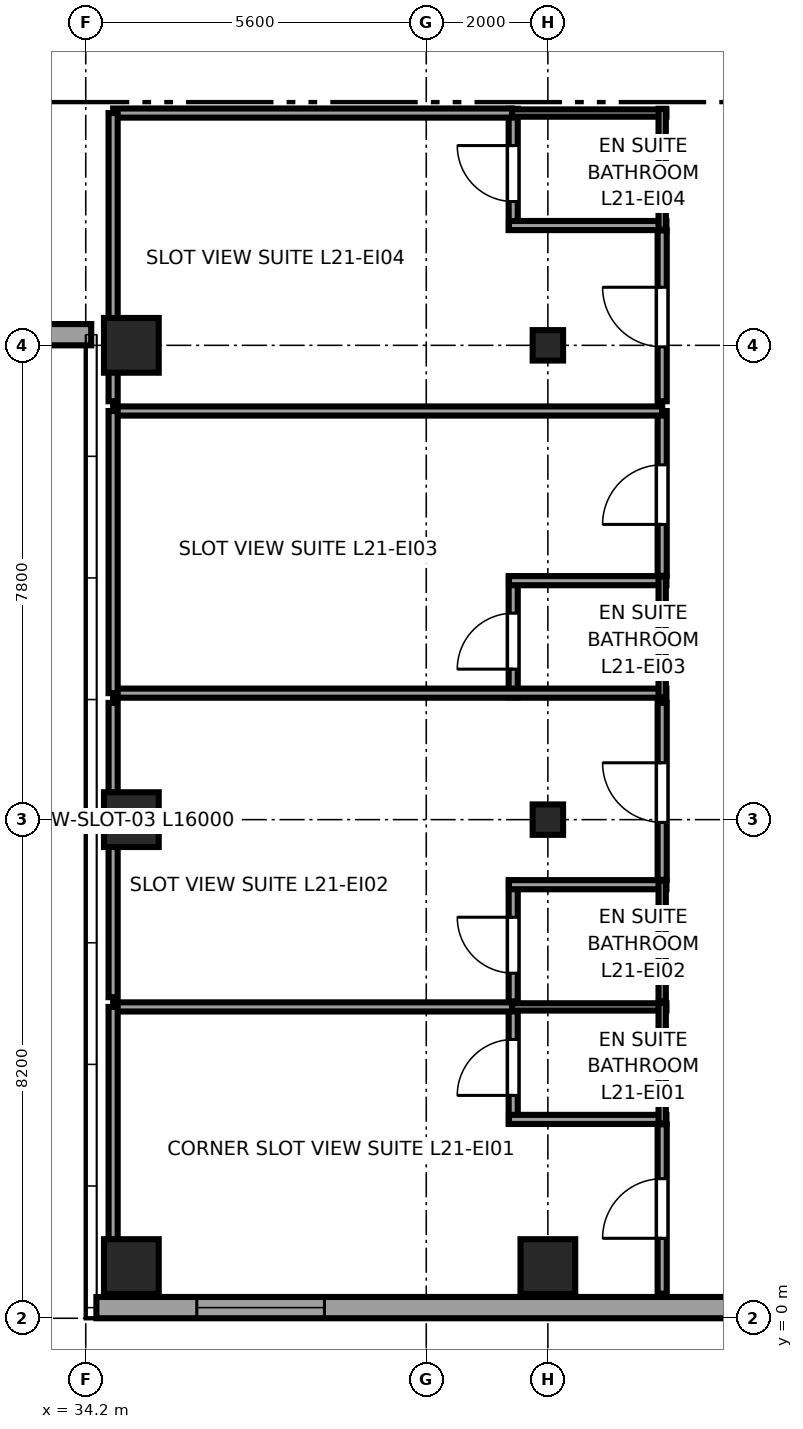
"""IFC4 building model, lengths in metres.
Left out: names, types, materials, properties, quantities, classifications, styles, units other than length and angle.
Written with IfcOpenShell. Run it as: python <this file> out.ifc"""

import sys

from ifc_helpers import new_model, si_unit, direction, frame, frame_2d, origin, origin_2d, place, context, subcontext, project, spatial, rectangle, i_section, extrude, source, transform, mapped, element, fill, save


model = new_model("IFC4")
c1 = context("Model", 3, precision=1e-05, world=origin(), true_north=direction((0.0, 1.0)))
c2 = subcontext(c1, "Body", "Model", "MODEL_VIEW")
j1 = project(units=[si_unit("LENGTHUNIT", "METRE"), si_unit("PLANEANGLEUNIT", "RADIAN")], contexts=[c1])
p1 = place(None, origin())
s1 = spatial("IfcSite", under=j1, at=p1, CompositionType="ELEMENT")
p2 = place(p1, origin())
s2 = spatial("IfcBuilding", under=s1, at=p2, CompositionType="ELEMENT")
p3 = place(p2, frame((0.0, 0.0, 85.25)))
s3 = spatial("IfcBuildingStorey", under=s2, at=p3, CompositionType="ELEMENT", Elevation=85.25)
m1 = source(origin(), c2, "Body", "SweptSolid", [
    extrude(rectangle(XDim=0.9, YDim=0.9, at=origin_2d()), origin(), (0.0, 0.0, 1.0), 3.55),
])
for number, where, z_axis, x_axis in (
    (1, (34.95, 0.85, 0.0), (0.0, 0.0, 1.0), (1.0, 0.0, 0.0)),
    (2, (34.95, 8.2, 0.0), (0.0, 0.0, 1.0), (1.0, 0.0, 0.0)),
    (3, (34.95, 16.0, 0.0), (0.0, 0.0, 1.0), (1.0, 0.0, 0.0)),
    (4, (41.8, 0.85, 0.0), (0.0, 0.0, 1.0), (1.0, 0.0, 0.0)),
):
    element("IfcColumn", number, at=place(p3, frame(where, z_axis=z_axis, x_axis=x_axis)), inside=s3, PredefinedType="COLUMN", context=c2, shape_type="MappedRepresentation", body=[
        mapped(m1, transform((0.0, 0.0, 0.0), x_axis=(1.0, 0.0, 0.0), y_axis=(0.0, 1.0, 0.0), z_axis=(0.0, 0.0, 1.0), scale=1.0)),
    ])
m2 = source(origin(), c2, "Body", "SweptSolid", [
    extrude(i_section(OverallWidth=0.5, OverallDepth=0.5, WebThickness=0.022, FlangeThickness=0.034, at=origin_2d()), origin(), (0.0, 0.0, 1.0), 3.55),
])
for number, where, z_axis, x_axis in (
    (5, (41.8, 8.2, 0.0), (0.0, 0.0, 1.0), (1.0, 0.0, 0.0)),
    (6, (41.8, 16.0, 0.0), (0.0, 0.0, 1.0), (1.0, 0.0, 0.0)),
):
    element("IfcColumn", number, at=place(p3, frame(where, z_axis=z_axis, x_axis=x_axis)), inside=s3, PredefinedType="COLUMN", context=c2, shape_type="MappedRepresentation", body=[
        mapped(m2, transform((0.0, 0.0, 0.0), x_axis=(1.0, 0.0, 0.0), y_axis=(0.0, 1.0, 0.0), z_axis=(0.0, 0.0, 1.0), scale=1.0)),
    ])
p4 = place(p3, frame((22.71, 16.175, 0.0), z_axis=(0.0, 0.0, 1.0), x_axis=(1.0, 0.0, 0.0)))
e7 = element("IfcWall", 7, at=p4, inside=s3, PredefinedType="SOLIDWALL", context=c2, shape_type="SweptSolid", body=[
    extrude(rectangle(XDim=11.58, YDim=0.35, at=frame_2d((5.79, 0.0))), origin(), (0.0, 0.0, 1.0), 2.748),
])
p5 = place(p4, frame((2.145, 0.0, 0.68)))
e8 = element("IfcOpeningElement", 8, at=p5, cuts=e7, PredefinedType="OPENING", context=c2, shape_type="SweptSolid", body=[
    extrude(rectangle(XDim=2.1, YDim=1.9, at=frame_2d((1.05, 0.95))), frame((0.0, 0.185, 0.0), z_axis=(0.0, -1.0, 0.0), x_axis=(1.0, 0.0, 0.0)), (0.0, 0.0, 1.0), 0.37),
])
p6 = place(p4, frame((7.335, 0.0, 0.68)))
e9 = element("IfcOpeningElement", 9, at=p6, cuts=e7, PredefinedType="OPENING", context=c2, shape_type="SweptSolid", body=[
    extrude(rectangle(XDim=2.1, YDim=1.9, at=frame_2d((1.05, 0.95))), frame((0.0, 0.185, 0.0), z_axis=(0.0, -1.0, 0.0), x_axis=(1.0, 0.0, 0.0)), (0.0, 0.0, 1.0), 0.37),
])
p7 = place(p3, frame((34.375, 0.175, 0.0), z_axis=(0.0, 0.0, 1.0), x_axis=(1.0, 0.0, 0.0)))
e10 = element("IfcWall", 10, at=p7, inside=s3, PredefinedType="SOLIDWALL", context=c2, shape_type="SweptSolid", body=[
    extrude(rectangle(XDim=18.008, YDim=0.35, at=frame_2d((9.004, 0.0))), origin(), (0.0, 0.0, 1.0), 3.37),
])
p8 = place(p7, frame((1.651, 0.0, 0.68)))
e11 = element("IfcOpeningElement", 11, at=p8, cuts=e10, PredefinedType="OPENING", context=c2, shape_type="SweptSolid", body=[
    extrude(rectangle(XDim=2.1, YDim=1.9, at=frame_2d((1.05, 0.95))), frame((0.0, 0.185, 0.0), z_axis=(0.0, -1.0, 0.0), x_axis=(1.0, 0.0, 0.0)), (0.0, 0.0, 1.0), 0.37),
])
p9 = place(p3, frame((41.23, 3.2, 0.0), z_axis=(0.0, 0.0, 1.0), x_axis=(0.0, 1.0, 0.0)))
e12 = element("IfcWall", 12, at=p9, inside=s3, PredefinedType="PARTITIONING", context=c2, shape_type="SweptSolid", body=[
    extrude(rectangle(XDim=1.99, YDim=0.15, at=frame_2d((0.995, 0.0))), origin(), (0.0, 0.0, 1.0), 3.37),
])
p10 = place(p9, frame((0.465, 0.0, 0.0)))
e13 = element("IfcOpeningElement", 13, at=p10, cuts=e12, PredefinedType="OPENING", context=c2, shape_type="SweptSolid", body=[
    extrude(rectangle(XDim=0.92, YDim=2.01, at=frame_2d((0.46, 1.005))), frame((0.0, 0.085, 0.0), z_axis=(0.0, -1.0, 0.0), x_axis=(1.0, 0.0, 0.0)), (0.0, 0.0, 1.0), 0.17),
])
p11 = place(p3, frame((41.16, 3.27, 0.0), z_axis=(0.0, 0.0, 1.0), x_axis=(1.0, 0.0, 0.0)))
e14 = element("IfcWall", 14, at=p11, inside=s3, PredefinedType="PARTITIONING", context=c2, shape_type="SweptSolid", body=[
    extrude(rectangle(XDim=2.59, YDim=0.15, at=frame_2d((1.295, 0.0))), origin(), (0.0, 0.0, 1.0), 3.37),
])
p12 = place(p3, frame((41.16, 5.12, 0.0), z_axis=(0.0, 0.0, 1.0), x_axis=(1.0, 0.0, 0.0)))
e15 = element("IfcWall", 15, at=p12, inside=s3, PredefinedType="PLUMBINGWALL", context=c2, shape_type="SweptSolid", body=[
    extrude(rectangle(XDim=2.59, YDim=0.12, at=frame_2d((1.295, 0.0))), origin(), (0.0, 0.0, 1.0), 3.37),
])
p13 = place(p3, frame((43.68, 3.2, 0.0), z_axis=(0.0, 0.0, 1.0), x_axis=(0.0, 1.0, 0.0)))
e16 = element("IfcWall", 16, at=p13, inside=s3, PredefinedType="PLUMBINGWALL", context=c2, shape_type="SweptSolid", body=[
    extrude(rectangle(XDim=1.99, YDim=0.12, at=frame_2d((0.995, 0.0))), origin(), (0.0, 0.0, 1.0), 3.37),
])
p14 = place(p3, frame((41.23, 5.21, 0.0), z_axis=(0.0, 0.0, 1.0), x_axis=(0.0, 1.0, 0.0)))
e17 = element("IfcWall", 17, at=p14, inside=s3, PredefinedType="PARTITIONING", context=c2, shape_type="SweptSolid", body=[
    extrude(rectangle(XDim=1.99, YDim=0.15, at=frame_2d((0.995, 0.0))), origin(), (0.0, 0.0, 1.0), 3.37),
])
p15 = place(p14, frame((0.465, 0.0, 0.0)))
e18 = element("IfcOpeningElement", 18, at=p15, cuts=e17, PredefinedType="OPENING", context=c2, shape_type="SweptSolid", body=[
    extrude(rectangle(XDim=0.92, YDim=2.01, at=frame_2d((0.46, 1.005))), frame((0.0, 0.085, 0.0), z_axis=(0.0, -1.0, 0.0), x_axis=(1.0, 0.0, 0.0)), (0.0, 0.0, 1.0), 0.17),
])
p16 = place(p3, frame((41.16, 7.13, 0.0), z_axis=(0.0, 0.0, 1.0), x_axis=(1.0, 0.0, 0.0)))
e19 = element("IfcWall", 19, at=p16, inside=s3, PredefinedType="PARTITIONING", context=c2, shape_type="SweptSolid", body=[
    extrude(rectangle(XDim=2.59, YDim=0.15, at=frame_2d((1.295, 0.0))), origin(), (0.0, 0.0, 1.0), 3.37),
])
p17 = place(p3, frame((43.68, 5.21, 0.0), z_axis=(0.0, 0.0, 1.0), x_axis=(0.0, 1.0, 0.0)))
e20 = element("IfcWall", 20, at=p17, inside=s3, PredefinedType="PLUMBINGWALL", context=c2, shape_type="SweptSolid", body=[
    extrude(rectangle(XDim=1.99, YDim=0.12, at=frame_2d((0.995, 0.0))), origin(), (0.0, 0.0, 1.0), 3.37),
])
p18 = place(p3, frame((41.23, 10.21, 0.0), z_axis=(0.0, 0.0, 1.0), x_axis=(0.0, 1.0, 0.0)))
e21 = element("IfcWall", 21, at=p18, inside=s3, PredefinedType="PARTITIONING", context=c2, shape_type="SweptSolid", body=[
    extrude(rectangle(XDim=1.99, YDim=0.15, at=frame_2d((0.995, 0.0))), origin(), (0.0, 0.0, 1.0), 3.37),
])
p19 = place(p18, frame((0.465, 0.0, 0.0)))
e22 = element("IfcOpeningElement", 22, at=p19, cuts=e21, PredefinedType="OPENING", context=c2, shape_type="SweptSolid", body=[
    extrude(rectangle(XDim=0.92, YDim=2.01, at=frame_2d((0.46, 1.005))), frame((0.0, 0.085, 0.0), z_axis=(0.0, -1.0, 0.0), x_axis=(1.0, 0.0, 0.0)), (0.0, 0.0, 1.0), 0.17),
])
p20 = place(p3, frame((34.65, 10.28, 0.0), z_axis=(0.0, 0.0, 1.0), x_axis=(1.0, 0.0, 0.0)))
e23 = element("IfcWall", 23, at=p20, inside=s3, PredefinedType="PARTITIONING", context=c2, shape_type="SweptSolid", body=[
    extrude(rectangle(XDim=9.1, YDim=0.15, at=frame_2d((4.55, 0.0))), origin(), (0.0, 0.0, 1.0), 3.37),
])
p21 = place(p3, frame((41.16, 12.13, 0.0), z_axis=(0.0, 0.0, 1.0), x_axis=(1.0, 0.0, 0.0)))
e24 = element("IfcWall", 24, at=p21, inside=s3, PredefinedType="PARTITIONING", context=c2, shape_type="SweptSolid", body=[
    extrude(rectangle(XDim=2.59, YDim=0.15, at=frame_2d((1.295, 0.0))), origin(), (0.0, 0.0, 1.0), 3.37),
])
p22 = place(p3, frame((43.68, 10.21, 0.0), z_axis=(0.0, 0.0, 1.0), x_axis=(0.0, 1.0, 0.0)))
e25 = element("IfcWall", 25, at=p22, inside=s3, PredefinedType="PLUMBINGWALL", context=c2, shape_type="SweptSolid", body=[
    extrude(rectangle(XDim=1.99, YDim=0.12, at=frame_2d((0.995, 0.0))), origin(), (0.0, 0.0, 1.0), 3.37),
])
p23 = place(p3, frame((41.23, 17.9, 0.0), z_axis=(0.0, 0.0, 1.0), x_axis=(0.0, 1.0, 0.0)))
e26 = element("IfcWall", 26, at=p23, inside=s3, PredefinedType="PARTITIONING", context=c2, shape_type="SweptSolid", body=[
    extrude(rectangle(XDim=1.99, YDim=0.15, at=frame_2d((0.995, 0.0))), origin(), (0.0, 0.0, 1.0), 3.37),
])
p24 = place(p23, frame((0.465, 0.0, 0.0)))
e27 = element("IfcOpeningElement", 27, at=p24, cuts=e26, PredefinedType="OPENING", context=c2, shape_type="SweptSolid", body=[
    extrude(rectangle(XDim=0.92, YDim=2.01, at=frame_2d((0.46, 1.005))), frame((0.0, 0.085, 0.0), z_axis=(0.0, -1.0, 0.0), x_axis=(1.0, 0.0, 0.0)), (0.0, 0.0, 1.0), 0.17),
])
p25 = place(p3, frame((41.16, 17.97, 0.0), z_axis=(0.0, 0.0, 1.0), x_axis=(1.0, 0.0, 0.0)))
e28 = element("IfcWall", 28, at=p25, inside=s3, PredefinedType="PARTITIONING", context=c2, shape_type="SweptSolid", body=[
    extrude(rectangle(XDim=2.59, YDim=0.15, at=frame_2d((1.295, 0.0))), origin(), (0.0, 0.0, 1.0), 3.37),
])
p26 = place(p3, frame((41.16, 19.82, 0.0), z_axis=(0.0, 0.0, 1.0), x_axis=(1.0, 0.0, 0.0)))
e29 = element("IfcWall", 29, at=p26, inside=s3, PredefinedType="PLUMBINGWALL", context=c2, shape_type="SweptSolid", body=[
    extrude(rectangle(XDim=2.59, YDim=0.12, at=frame_2d((1.295, 0.0))), origin(), (0.0, 0.0, 1.0), 3.37),
])
p27 = place(p3, frame((43.68, 17.9, 0.0), z_axis=(0.0, 0.0, 1.0), x_axis=(0.0, 1.0, 0.0)))
e30 = element("IfcWall", 30, at=p27, inside=s3, PredefinedType="PLUMBINGWALL", context=c2, shape_type="SweptSolid", body=[
    extrude(rectangle(XDim=1.99, YDim=0.12, at=frame_2d((0.995, 0.0))), origin(), (0.0, 0.0, 1.0), 3.37),
])
p28 = place(p3, frame((43.68, 0.405, 0.0), z_axis=(0.0, 0.0, 1.0), x_axis=(0.0, 1.0, 0.0)))
e31 = element("IfcWall", 31, at=p28, inside=s3, PredefinedType="PARTITIONING", context=c2, shape_type="SweptSolid", body=[
    extrude(rectangle(XDim=2.785, YDim=0.15, at=frame_2d((1.393, 0.0))), origin(), (0.0, 0.0, 1.0), 3.37),
])
p29 = place(p28, frame((0.91, 0.0, 0.0)))
e32 = element("IfcOpeningElement", 32, at=p29, cuts=e31, PredefinedType="OPENING", context=c2, shape_type="SweptSolid", body=[
    extrude(rectangle(XDim=0.98, YDim=2.12, at=frame_2d((0.49, 1.06))), frame((0.0, 0.085, 0.0), z_axis=(0.0, -1.0, 0.0), x_axis=(1.0, 0.0, 0.0)), (0.0, 0.0, 1.0), 0.17),
])
p30 = place(p3, frame((34.65, 5.12, 0.0), z_axis=(0.0, 0.0, 1.0), x_axis=(1.0, 0.0, 0.0)))
e33 = element("IfcWall", 33, at=p30, inside=s3, PredefinedType="PARTITIONING", context=c2, shape_type="SweptSolid", body=[
    extrude(rectangle(XDim=6.56, YDim=0.15, at=frame_2d((3.28, 0.0))), origin(), (0.0, 0.0, 1.0), 3.37),
])
p31 = place(p3, frame((34.65, 0.405, 0.0), z_axis=(0.0, 0.0, 1.0), x_axis=(0.0, 1.0, 0.0)))
e34 = element("IfcWall", 34, at=p31, inside=s3, PredefinedType="PARTITIONING", context=c2, shape_type="SweptSolid", body=[
    extrude(rectangle(XDim=4.715, YDim=0.15, at=frame_2d((2.357, 0.0))), origin(), (0.0, 0.0, 1.0), 3.37),
])
p32 = place(p3, frame((43.68, 7.21, 0.0), z_axis=(0.0, 0.0, 1.0), x_axis=(0.0, 1.0, 0.0)))
e35 = element("IfcWall", 35, at=p32, inside=s3, PredefinedType="PARTITIONING", context=c2, shape_type="SweptSolid", body=[
    extrude(rectangle(XDim=2.91, YDim=0.15, at=frame_2d((1.455, 0.0))), origin(), (0.0, 0.0, 1.0), 3.37),
])
p33 = place(p32, frame((0.945, 0.0, 0.0)))
e36 = element("IfcOpeningElement", 36, at=p33, cuts=e35, PredefinedType="OPENING", context=c2, shape_type="SweptSolid", body=[
    extrude(rectangle(XDim=0.98, YDim=2.12, at=frame_2d((0.49, 1.06))), frame((0.0, 0.085, 0.0), z_axis=(0.0, -1.0, 0.0), x_axis=(1.0, 0.0, 0.0)), (0.0, 0.0, 1.0), 0.17),
])
p34 = place(p3, frame((34.65, 5.28, 0.0), z_axis=(0.0, 0.0, 1.0), x_axis=(0.0, 1.0, 0.0)))
e37 = element("IfcWall", 37, at=p34, inside=s3, PredefinedType="PARTITIONING", context=c2, shape_type="SweptSolid", body=[
    extrude(rectangle(XDim=4.84, YDim=0.15, at=frame_2d((2.42, 0.0))), origin(), (0.0, 0.0, 1.0), 3.37),
])
p35 = place(p3, frame((43.68, 12.21, 0.0), z_axis=(0.0, 0.0, 1.0), x_axis=(0.0, 1.0, 0.0)))
e38 = element("IfcWall", 38, at=p35, inside=s3, PredefinedType="PARTITIONING", context=c2, shape_type="SweptSolid", body=[
    extrude(rectangle(XDim=2.71, YDim=0.15, at=frame_2d((1.355, 0.0))), origin(), (0.0, 0.0, 1.0), 3.37),
])
p36 = place(p35, frame((0.845, 0.0, 0.0)))
e39 = element("IfcOpeningElement", 39, at=p36, cuts=e38, PredefinedType="OPENING", context=c2, shape_type="SweptSolid", body=[
    extrude(rectangle(XDim=0.98, YDim=2.12, at=frame_2d((0.49, 1.06))), frame((0.0, 0.085, 0.0), z_axis=(0.0, -1.0, 0.0), x_axis=(1.0, 0.0, 0.0)), (0.0, 0.0, 1.0), 0.17),
])
p37 = place(p3, frame((34.65, 14.92, 0.0), z_axis=(0.0, 0.0, 1.0), x_axis=(1.0, 0.0, 0.0)))
e40 = element("IfcWall", 40, at=p37, inside=s3, PredefinedType="PARTITIONING", context=c2, shape_type="SweptSolid", body=[
    extrude(rectangle(XDim=9.03, YDim=0.15, at=frame_2d((4.515, 0.0))), origin(), (0.0, 0.0, 1.0), 3.37),
])
p38 = place(p3, frame((34.65, 10.28, 0.0), z_axis=(0.0, 0.0, 1.0), x_axis=(0.0, 1.0, 0.0)))
e41 = element("IfcWall", 41, at=p38, inside=s3, PredefinedType="PARTITIONING", context=c2, shape_type="SweptSolid", body=[
    extrude(rectangle(XDim=4.64, YDim=0.15, at=frame_2d((2.32, 0.0))), origin(), (0.0, 0.0, 1.0), 3.37),
])
p39 = place(p3, frame((43.68, 15.08, 0.0), z_axis=(0.0, 0.0, 1.0), x_axis=(0.0, 1.0, 0.0)))
e42 = element("IfcWall", 42, at=p39, inside=s3, PredefinedType="PARTITIONING", context=c2, shape_type="SweptSolid", body=[
    extrude(rectangle(XDim=2.81, YDim=0.15, at=frame_2d((1.405, 0.0))), origin(), (0.0, 0.0, 1.0), 3.37),
])
p40 = place(p39, frame((0.895, 0.0, 0.0)))
e43 = element("IfcOpeningElement", 43, at=p40, cuts=e42, PredefinedType="OPENING", context=c2, shape_type="SweptSolid", body=[
    extrude(rectangle(XDim=0.98, YDim=2.12, at=frame_2d((0.49, 1.06))), frame((0.0, 0.085, 0.0), z_axis=(0.0, -1.0, 0.0), x_axis=(1.0, 0.0, 0.0)), (0.0, 0.0, 1.0), 0.17),
])
p41 = place(p3, frame((34.65, 19.82, 0.0), z_axis=(0.0, 0.0, 1.0), x_axis=(1.0, 0.0, 0.0)))
e44 = element("IfcWall", 44, at=p41, inside=s3, PredefinedType="PARTITIONING", context=c2, shape_type="SweptSolid", body=[
    extrude(rectangle(XDim=6.56, YDim=0.15, at=frame_2d((3.28, 0.0))), origin(), (0.0, 0.0, 1.0), 3.37),
])
p42 = place(p3, frame((34.65, 15.08, 0.0), z_axis=(0.0, 0.0, 1.0), x_axis=(0.0, 1.0, 0.0)))
e45 = element("IfcWall", 45, at=p42, inside=s3, PredefinedType="PARTITIONING", context=c2, shape_type="SweptSolid", body=[
    extrude(rectangle(XDim=4.74, YDim=0.15, at=frame_2d((2.37, 0.0))), origin(), (0.0, 0.0, 1.0), 3.37),
])
m3 = source(origin(), c2, "Body", "SweptSolid", [
    extrude(rectangle(XDim=2.1, YDim=1.9, at=frame_2d((1.05, 0.95))), frame((0.0, 0.09, 0.0), z_axis=(0.0, -1.0, 0.0), x_axis=(1.0, 0.0, 0.0)), (0.0, 0.0, 1.0), 0.06),
])
p43 = place(p8, origin())
e46 = element("IfcWindow", 46, at=p43, inside=s3, PartitioningType="TRIPLE_PANEL_HORIZONTAL", PredefinedType="WINDOW", context=c2, shape_type="MappedRepresentation", body=[
    mapped(m3, transform((0.0, 0.0, 0.0), x_axis=(1.0, 0.0, 0.0), y_axis=(0.0, 1.0, 0.0), z_axis=(0.0, 0.0, 1.0), scale=1.0)),
])
fill(e11, e46)
m4 = source(origin(), c2, "Body", "SweptSolid", [
    extrude(rectangle(XDim=0.92, YDim=2.01, at=frame_2d((0.46, 1.005))), frame((0.0, 0.025, 0.0), z_axis=(0.0, -1.0, 0.0), x_axis=(1.0, 0.0, 0.0)), (0.0, 0.0, 1.0), 0.05),
])
p44 = place(p10, origin())
e47 = element("IfcDoor", 47, at=p44, inside=s3, OperationType="SINGLE_SWING_LEFT", PredefinedType="DOOR", context=c2, shape_type="MappedRepresentation", body=[
    mapped(m4, transform((0.0, 0.0, 0.0), x_axis=(1.0, 0.0, 0.0), y_axis=(0.0, 1.0, 0.0), z_axis=(0.0, 0.0, 1.0), scale=1.0)),
])
fill(e13, e47)
p45 = place(p15, origin())
e48 = element("IfcDoor", 48, at=p45, inside=s3, OperationType="SINGLE_SWING_RIGHT", PredefinedType="DOOR", context=c2, shape_type="MappedRepresentation", body=[
    mapped(m4, transform((0.0, 0.0, 0.0), x_axis=(1.0, 0.0, 0.0), y_axis=(0.0, 1.0, 0.0), z_axis=(0.0, 0.0, 1.0), scale=1.0)),
])
fill(e18, e48)
p46 = place(p19, origin())
e49 = element("IfcDoor", 49, at=p46, inside=s3, OperationType="SINGLE_SWING_LEFT", PredefinedType="DOOR", context=c2, shape_type="MappedRepresentation", body=[
    mapped(m4, transform((0.0, 0.0, 0.0), x_axis=(1.0, 0.0, 0.0), y_axis=(0.0, 1.0, 0.0), z_axis=(0.0, 0.0, 1.0), scale=1.0)),
])
fill(e22, e49)
p47 = place(p24, origin())
e50 = element("IfcDoor", 50, at=p47, inside=s3, OperationType="SINGLE_SWING_RIGHT", PredefinedType="DOOR", context=c2, shape_type="MappedRepresentation", body=[
    mapped(m4, transform((0.0, 0.0, 0.0), x_axis=(1.0, 0.0, 0.0), y_axis=(0.0, 1.0, 0.0), z_axis=(0.0, 0.0, 1.0), scale=1.0)),
])
fill(e27, e50)
m5 = source(origin(), c2, "Body", "SweptSolid", [
    extrude(rectangle(XDim=0.98, YDim=2.12, at=frame_2d((0.49, 1.06))), frame((0.0, 0.025, 0.0), z_axis=(0.0, -1.0, 0.0), x_axis=(1.0, 0.0, 0.0)), (0.0, 0.0, 1.0), 0.05),
])
p48 = place(p29, origin())
e51 = element("IfcDoor", 51, at=p48, inside=s3, OperationType="SINGLE_SWING_LEFT", PredefinedType="DOOR", context=c2, shape_type="MappedRepresentation", body=[
    mapped(m5, transform((0.0, 0.0, 0.0), x_axis=(1.0, 0.0, 0.0), y_axis=(0.0, 1.0, 0.0), z_axis=(0.0, 0.0, 1.0), scale=1.0)),
])
fill(e32, e51)
p49 = place(p33, origin())
e52 = element("IfcDoor", 52, at=p49, inside=s3, OperationType="SINGLE_SWING_RIGHT", PredefinedType="DOOR", context=c2, shape_type="MappedRepresentation", body=[
    mapped(m5, transform((0.0, 0.0, 0.0), x_axis=(1.0, 0.0, 0.0), y_axis=(0.0, 1.0, 0.0), z_axis=(0.0, 0.0, 1.0), scale=1.0)),
])
fill(e36, e52)
p50 = place(p36, origin())
e53 = element("IfcDoor", 53, at=p50, inside=s3, OperationType="SINGLE_SWING_LEFT", PredefinedType="DOOR", context=c2, shape_type="MappedRepresentation", body=[
    mapped(m5, transform((0.0, 0.0, 0.0), x_axis=(1.0, 0.0, 0.0), y_axis=(0.0, 1.0, 0.0), z_axis=(0.0, 0.0, 1.0), scale=1.0)),
])
fill(e39, e53)
p51 = place(p40, origin())
e54 = element("IfcDoor", 54, at=p51, inside=s3, OperationType="SINGLE_SWING_RIGHT", PredefinedType="DOOR", context=c2, shape_type="MappedRepresentation", body=[
    mapped(m5, transform((0.0, 0.0, 0.0), x_axis=(1.0, 0.0, 0.0), y_axis=(0.0, 1.0, 0.0), z_axis=(0.0, 0.0, 1.0), scale=1.0)),
])
fill(e43, e54)
save(model, sys.argv[1])
